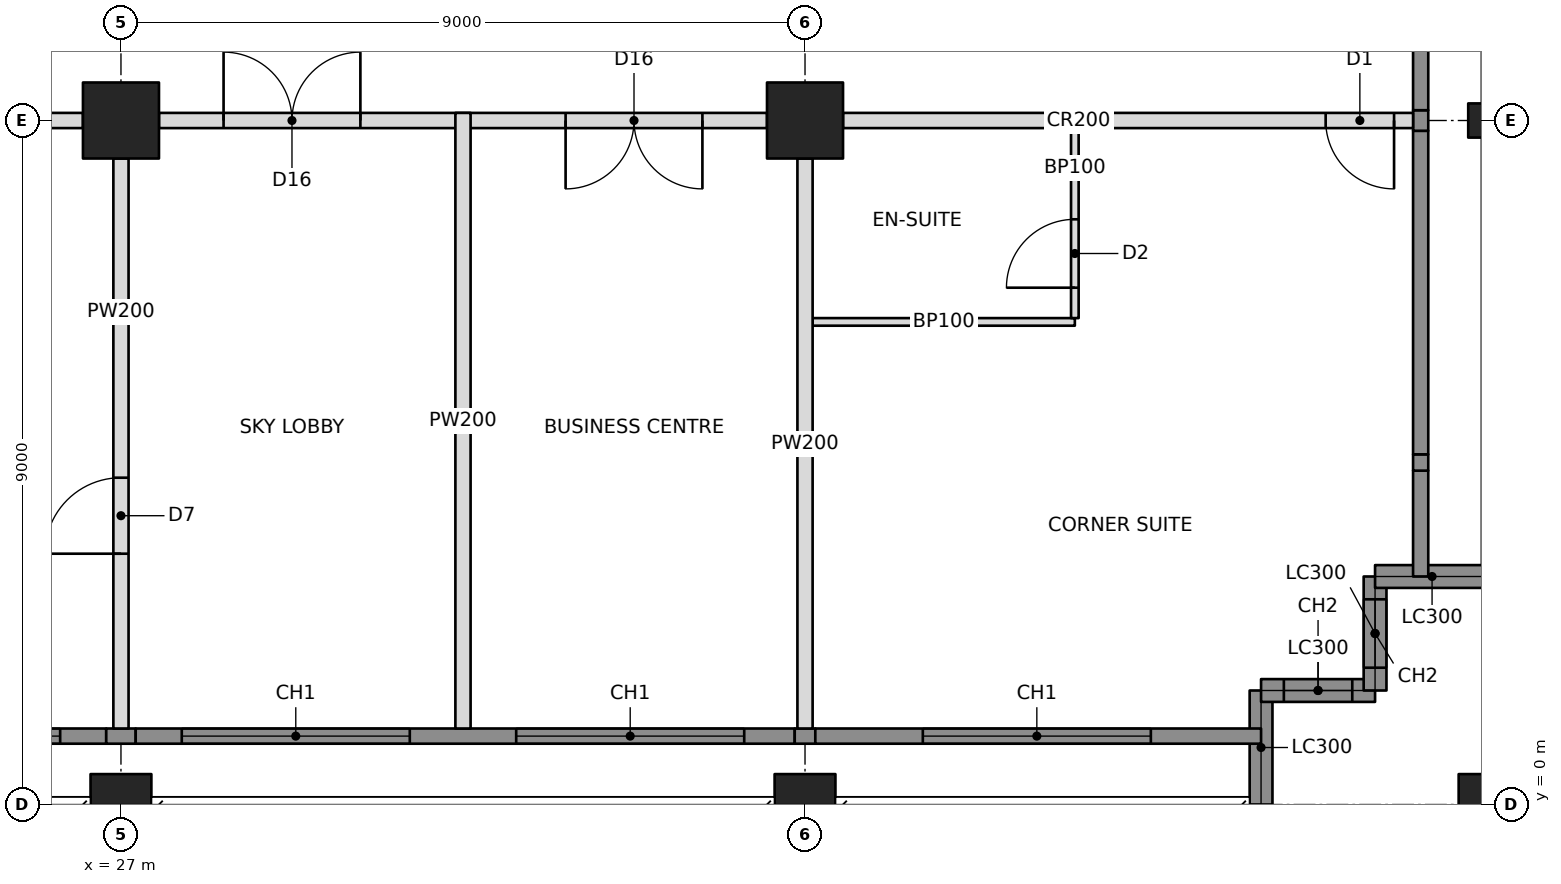
"""IFC4 building model, lengths in metres.
Left out: names, types, materials, properties, quantities, classifications, styles, units other than length and angle.
Written with IfcOpenShell. Run it as: python <this file> out.ifc"""

import sys

from ifc_helpers import new_model, si_unit, direction, frame, frame_2d, origin, origin_2d, place, context, subcontext, project, spatial, rectangle, hollow_rectangle, i_section, extrude, element, fill, save


model = new_model("IFC4")
c1 = context("Model", 3, precision=1e-05, world=origin(), true_north=direction((0.0, 1.0)))
c2 = subcontext(c1, "Body", "Model", "MODEL_VIEW")
j1 = project(units=[si_unit("LENGTHUNIT", "METRE"), si_unit("PLANEANGLEUNIT", "RADIAN")], contexts=[c1])
p1 = place(None, origin())
s1 = spatial("IfcSite", under=j1, at=p1, CompositionType="ELEMENT")
p2 = place(p1, origin())
s2 = spatial("IfcBuilding", under=s1, at=p2, CompositionType="ELEMENT")
p3 = place(p2, frame((0.0, 0.0, 160.4)))
s3 = spatial("IfcBuildingStorey", under=s2, at=p3, CompositionType="ELEMENT", Elevation=160.4)
p4 = place(p3, frame((27.0, 0.0, 0.0), z_axis=(0.0, 0.0, 1.0), x_axis=(1.0, 0.0, 0.0)))
e1 = element("IfcColumn", 1, at=p4, inside=s3, PredefinedType="COLUMN", context=c2, shape_type="SweptSolid", body=[
    extrude(hollow_rectangle(XDim=0.8, YDim=0.8, WallThickness=0.07, at=origin_2d()), origin(), (0.0, 0.0, 1.0), 3.4),
])
p5 = place(p3, frame((27.0, 9.0, 0.0), z_axis=(0.0, 0.0, 1.0), x_axis=(1.0, 0.0, 0.0)))
e2 = element("IfcColumn", 2, at=p5, inside=s3, PredefinedType="COLUMN", context=c2, shape_type="SweptSolid", body=[
    extrude(hollow_rectangle(XDim=1.0, YDim=1.0, WallThickness=0.1, at=origin_2d()), origin(), (0.0, 0.0, 1.0), 3.4),
])
p6 = place(p3, frame((36.0, 0.0, 0.0), z_axis=(0.0, 0.0, 1.0), x_axis=(1.0, 0.0, 0.0)))
e3 = element("IfcColumn", 3, at=p6, inside=s3, PredefinedType="COLUMN", context=c2, shape_type="SweptSolid", body=[
    extrude(hollow_rectangle(XDim=0.8, YDim=0.8, WallThickness=0.07, at=origin_2d()), origin(), (0.0, 0.0, 1.0), 3.4),
])
p7 = place(p3, frame((36.0, 9.0, 0.0), z_axis=(0.0, 0.0, 1.0), x_axis=(0.0, 1.0, 0.0)))
e4 = element("IfcColumn", 4, at=p7, inside=s3, PredefinedType="COLUMN", context=c2, shape_type="SweptSolid", body=[
    extrude(hollow_rectangle(XDim=1.0, YDim=1.0, WallThickness=0.1, at=origin_2d()), origin(), (0.0, 0.0, 1.0), 3.4),
])
p8 = place(p3, frame((45.0, 0.0, 0.0), z_axis=(0.0, 0.0, 1.0), x_axis=(1.0, 0.0, 0.0)))
e5 = element("IfcColumn", 5, at=p8, inside=s3, PredefinedType="COLUMN", context=c2, shape_type="SweptSolid", body=[
    extrude(hollow_rectangle(XDim=0.8, YDim=0.8, WallThickness=0.07, at=origin_2d()), origin(), (0.0, 0.0, 1.0), 3.4),
])
p9 = place(p3, frame((45.0, 9.0, 0.0), z_axis=(0.0, 0.0, 1.0), x_axis=(0.0, 1.0, 0.0)))
e6 = element("IfcColumn", 6, at=p9, inside=s3, PredefinedType="COLUMN", context=c2, shape_type="SweptSolid", body=[
    extrude(i_section(OverallWidth=0.449, OverallDepth=0.549, WebThickness=0.072, FlangeThickness=0.115, at=origin_2d()), origin(), (0.0, 0.0, 1.0), 3.4),
])
p10 = place(p3, frame((42.0, 0.0, 0.0), z_axis=(0.0, 0.0, 1.0), x_axis=(0.0, 1.0, 0.0)))
e7 = element("IfcWall", 7, at=p10, inside=s3, PredefinedType="SOLIDWALL", context=c2, shape_type="SweptSolid", body=[
    extrude(rectangle(XDim=1.5, YDim=0.3, at=frame_2d((0.75, 0.0))), origin(), (0.0, 0.0, 1.0), 2.42),
])
p11 = place(p3, frame((42.0, 1.5, 0.0), z_axis=(0.0, 0.0, 1.0), x_axis=(1.0, 0.0, 0.0)))
e8 = element("IfcWall", 8, at=p11, inside=s3, PredefinedType="SOLIDWALL", context=c2, shape_type="SweptSolid", body=[
    extrude(rectangle(XDim=1.5, YDim=0.3, at=frame_2d((0.75, 0.0))), origin(), (0.0, 0.0, 1.0), 3.2),
])
p12 = place(p11, frame((0.3, 0.0, 0.6)))
e9 = element("IfcOpeningElement", 9, at=p12, cuts=e8, PredefinedType="OPENING", context=c2, shape_type="SweptSolid", body=[
    extrude(rectangle(XDim=0.9, YDim=2.2, at=frame_2d((0.45, 1.1))), frame((0.0, 0.16, 0.0), z_axis=(0.0, -1.0, 0.0), x_axis=(1.0, 0.0, 0.0)), (0.0, 0.0, 1.0), 0.32),
])
p13 = place(p3, frame((43.5, 1.5, 0.0), z_axis=(0.0, 0.0, 1.0), x_axis=(0.0, 1.0, 0.0)))
e10 = element("IfcWall", 10, at=p13, inside=s3, PredefinedType="SOLIDWALL", context=c2, shape_type="SweptSolid", body=[
    extrude(rectangle(XDim=1.5, YDim=0.3, at=frame_2d((0.75, 0.0))), origin(), (0.0, 0.0, 1.0), 3.2),
])
p14 = place(p13, frame((0.3, 0.0, 0.6)))
e11 = element("IfcOpeningElement", 11, at=p14, cuts=e10, PredefinedType="OPENING", context=c2, shape_type="SweptSolid", body=[
    extrude(rectangle(XDim=0.9, YDim=2.2, at=frame_2d((0.45, 1.1))), frame((0.0, 0.16, 0.0), z_axis=(0.0, -1.0, 0.0), x_axis=(1.0, 0.0, 0.0)), (0.0, 0.0, 1.0), 0.32),
])
p15 = place(p3, frame((43.5, 3.0, 0.0), z_axis=(0.0, 0.0, 1.0), x_axis=(1.0, 0.0, 0.0)))
e12 = element("IfcWall", 12, at=p15, inside=s3, PredefinedType="SOLIDWALL", context=c2, shape_type="SweptSolid", body=[
    extrude(rectangle(XDim=1.5, YDim=0.3, at=frame_2d((0.75, 0.0))), origin(), (0.0, 0.0, 1.0), 2.42),
])
p16 = place(p3, frame((44.1, 3.0, 0.0), z_axis=(0.0, 0.0, 1.0), x_axis=(0.0, 1.0, 0.0)))
e13 = element("IfcWall", 13, at=p16, inside=s3, PredefinedType="SOLIDWALL", context=c2, shape_type="SweptSolid", body=[
    extrude(rectangle(XDim=1.393, YDim=0.2, at=frame_2d((0.696, 0.0))), origin(), (0.0, 0.0, 1.0), 3.2),
])
p17 = place(p3, frame((27.5, 9.0, 0.0), z_axis=(0.0, 0.0, 1.0), x_axis=(1.0, 0.0, 0.0)))
e14 = element("IfcWall", 14, at=p17, inside=s3, PredefinedType="PARTITIONING", context=c2, shape_type="SweptSolid", body=[
    extrude(rectangle(XDim=8.0, YDim=0.2, at=frame_2d((4.0, 0.0))), origin(), (0.0, 0.0, 1.0), 2.405),
])
p18 = place(p17, frame((0.85, 0.0, 0.0)))
e15 = element("IfcOpeningElement", 15, at=p18, cuts=e14, PredefinedType="OPENING", context=c2, shape_type="SweptSolid", body=[
    extrude(rectangle(XDim=1.8, YDim=2.4, at=frame_2d((0.9, 1.2))), frame((0.0, 0.11, 0.0), z_axis=(0.0, -1.0, 0.0), x_axis=(1.0, 0.0, 0.0)), (0.0, 0.0, 1.0), 0.22),
])
p19 = place(p17, frame((5.35, 0.0, 0.0)))
e16 = element("IfcOpeningElement", 16, at=p19, cuts=e14, PredefinedType="OPENING", context=c2, shape_type="SweptSolid", body=[
    extrude(rectangle(XDim=1.8, YDim=2.4, at=frame_2d((0.9, 1.2))), frame((0.0, 0.11, 0.0), z_axis=(0.0, -1.0, 0.0), x_axis=(1.0, 0.0, 0.0)), (0.0, 0.0, 1.0), 0.22),
])
p20 = place(p3, frame((36.5, 9.0, 0.0), z_axis=(0.0, 0.0, 1.0), x_axis=(1.0, 0.0, 0.0)))
e17 = element("IfcWall", 17, at=p20, inside=s3, PredefinedType="PARTITIONING", context=c2, shape_type="SweptSolid", body=[
    extrude(rectangle(XDim=7.5, YDim=0.2, at=frame_2d((3.75, 0.0))), origin(), (0.0, 0.0, 1.0), 2.438),
])
p21 = place(p20, frame((6.35, 0.0, 0.0)))
e18 = element("IfcOpeningElement", 18, at=p21, cuts=e17, PredefinedType="OPENING", context=c2, shape_type="SweptSolid", body=[
    extrude(rectangle(XDim=0.9, YDim=2.1, at=frame_2d((0.45, 1.05))), frame((0.0, 0.11, 0.0), z_axis=(0.0, -1.0, 0.0), x_axis=(1.0, 0.0, 0.0)), (0.0, 0.0, 1.0), 0.22),
])
p22 = place(p3, frame((27.0, 8.5, 0.0), z_axis=(0.0, 0.0, 1.0), x_axis=(0.0, -1.0, 0.0)))
e19 = element("IfcWall", 19, at=p22, inside=s3, PredefinedType="PARTITIONING", context=c2, shape_type="SweptSolid", body=[
    extrude(rectangle(XDim=7.5, YDim=0.2, at=frame_2d((3.75, 0.0))), origin(), (0.0, 0.0, 1.0), 2.405),
])
p23 = place(p22, frame((4.2, 0.0, 0.0)))
e20 = element("IfcOpeningElement", 20, at=p23, cuts=e19, PredefinedType="OPENING", context=c2, shape_type="SweptSolid", body=[
    extrude(rectangle(XDim=1.0, YDim=2.1, at=frame_2d((0.5, 1.05))), frame((0.0, 0.11, 0.0), z_axis=(0.0, -1.0, 0.0), x_axis=(1.0, 0.0, 0.0)), (0.0, 0.0, 1.0), 0.22),
])
p24 = place(p3, frame((36.0, 8.5, 0.0), z_axis=(0.0, 0.0, 1.0), x_axis=(0.0, -1.0, 0.0)))
e21 = element("IfcWall", 21, at=p24, inside=s3, PredefinedType="PARTITIONING", context=c2, shape_type="SweptSolid", body=[
    extrude(rectangle(XDim=7.5, YDim=0.2, at=frame_2d((3.75, 0.0))), origin(), (0.0, 0.0, 1.0), 2.438),
])
p25 = place(p3, frame((23.65, 9.0, 0.0), z_axis=(0.0, 0.0, 1.0), x_axis=(1.0, 0.0, 0.0)))
e22 = element("IfcWall", 22, at=p25, inside=s3, PredefinedType="PARTITIONING", context=c2, shape_type="SweptSolid", body=[
    extrude(rectangle(XDim=2.85, YDim=0.2, at=frame_2d((1.425, 0.0))), origin(), (0.0, 0.0, 1.0), 2.405),
])
p26 = place(p3, frame((31.5, 9.1, 0.0), z_axis=(0.0, 0.0, 1.0), x_axis=(0.0, -1.0, 0.0)))
e23 = element("IfcWall", 23, at=p26, inside=s3, PredefinedType="PARTITIONING", context=c2, shape_type="SweptSolid", body=[
    extrude(rectangle(XDim=8.1, YDim=0.2, at=frame_2d((4.05, 0.0))), origin(), (0.0, 0.0, 1.0), 2.404),
])
p27 = place(p3, frame((36.1, 6.35, 0.0), z_axis=(0.0, 0.0, 1.0), x_axis=(1.0, 0.0, 0.0)))
e24 = element("IfcWall", 24, at=p27, inside=s3, PredefinedType="PARTITIONING", context=c2, shape_type="SweptSolid", body=[
    extrude(rectangle(XDim=3.45, YDim=0.1, at=frame_2d((1.725, 0.0))), origin(), (0.0, 0.0, 1.0), 2.438),
])
p28 = place(p3, frame((39.55, 8.9, 0.0), z_axis=(0.0, 0.0, 1.0), x_axis=(0.0, -1.0, 0.0)))
e25 = element("IfcWall", 25, at=p28, inside=s3, PredefinedType="PARTITIONING", context=c2, shape_type="SweptSolid", body=[
    extrude(rectangle(XDim=2.5, YDim=0.1, at=frame_2d((1.25, 0.0))), origin(), (0.0, 0.0, 1.0), 2.438),
])
p29 = place(p28, frame((1.2, 0.0, 0.0)))
e26 = element("IfcOpeningElement", 26, at=p29, cuts=e25, PredefinedType="OPENING", context=c2, shape_type="SweptSolid", body=[
    extrude(rectangle(XDim=0.9, YDim=2.1, at=frame_2d((0.45, 1.05))), frame((0.0, 0.06, 0.0), z_axis=(0.0, -1.0, 0.0), x_axis=(1.0, 0.0, 0.0)), (0.0, 0.0, 1.0), 0.12),
])
p30 = place(p3, frame((18.194, 0.9, 0.0), z_axis=(0.0, 0.0, 1.0), x_axis=(1.0, 0.0, 0.0)))
e27 = element("IfcWall", 27, at=p30, inside=s3, PredefinedType="SOLIDWALL", context=c2, shape_type="SweptSolid", body=[
    extrude(rectangle(XDim=8.612, YDim=0.2, at=frame_2d((4.306, 0.0))), origin(), (0.0, 0.0, 1.0), 3.2),
])
p31 = place(p30, frame((0.606, 0.0, 0.6)))
e28 = element("IfcOpeningElement", 28, at=p31, cuts=e27, PredefinedType="OPENING", context=c2, shape_type="SweptSolid", body=[
    extrude(rectangle(XDim=3.0, YDim=2.2, at=frame_2d((1.5, 1.1))), frame((0.0, 0.11, 0.0), z_axis=(0.0, -1.0, 0.0), x_axis=(1.0, 0.0, 0.0)), (0.0, 0.0, 1.0), 0.22),
])
p32 = place(p30, frame((5.006, 0.0, 0.6)))
e29 = element("IfcOpeningElement", 29, at=p32, cuts=e27, PredefinedType="OPENING", context=c2, shape_type="SweptSolid", body=[
    extrude(rectangle(XDim=3.0, YDim=2.2, at=frame_2d((1.5, 1.1))), frame((0.0, 0.11, 0.0), z_axis=(0.0, -1.0, 0.0), x_axis=(1.0, 0.0, 0.0)), (0.0, 0.0, 1.0), 0.22),
])
p33 = place(p3, frame((26.806, 0.9, 0.0), z_axis=(0.0, 0.0, 1.0), x_axis=(1.0, 0.0, 0.0)))
e30 = element("IfcWall", 30, at=p33, inside=s3, PredefinedType="SOLIDWALL", context=c2, shape_type="SweptSolid", body=[
    extrude(rectangle(XDim=0.388, YDim=0.2, at=frame_2d((0.194, 0.0))), origin(), (0.0, 0.0, 1.0), 2.404),
])
p34 = place(p3, frame((27.194, 0.9, 0.0), z_axis=(0.0, 0.0, 1.0), x_axis=(1.0, 0.0, 0.0)))
e31 = element("IfcWall", 31, at=p34, inside=s3, PredefinedType="SOLIDWALL", context=c2, shape_type="SweptSolid", body=[
    extrude(rectangle(XDim=8.671, YDim=0.2, at=frame_2d((4.335, 0.0))), origin(), (0.0, 0.0, 1.0), 3.2),
])
p35 = place(p34, frame((0.606, 0.0, 0.6)))
e32 = element("IfcOpeningElement", 32, at=p35, cuts=e31, PredefinedType="OPENING", context=c2, shape_type="SweptSolid", body=[
    extrude(rectangle(XDim=3.0, YDim=2.2, at=frame_2d((1.5, 1.1))), frame((0.0, 0.11, 0.0), z_axis=(0.0, -1.0, 0.0), x_axis=(1.0, 0.0, 0.0)), (0.0, 0.0, 1.0), 0.22),
])
p36 = place(p34, frame((5.006, 0.0, 0.6)))
e33 = element("IfcOpeningElement", 33, at=p36, cuts=e31, PredefinedType="OPENING", context=c2, shape_type="SweptSolid", body=[
    extrude(rectangle(XDim=3.0, YDim=2.2, at=frame_2d((1.5, 1.1))), frame((0.0, 0.11, 0.0), z_axis=(0.0, -1.0, 0.0), x_axis=(1.0, 0.0, 0.0)), (0.0, 0.0, 1.0), 0.22),
])
p37 = place(p3, frame((35.865, 0.9, 0.0), z_axis=(0.0, 0.0, 1.0), x_axis=(1.0, 0.0, 0.0)))
e34 = element("IfcWall", 34, at=p37, inside=s3, PredefinedType="SOLIDWALL", context=c2, shape_type="SweptSolid", body=[
    extrude(rectangle(XDim=0.271, YDim=0.2, at=frame_2d((0.135, 0.0))), origin(), (0.0, 0.0, 1.0), 2.438),
])
p38 = place(p3, frame((36.135, 0.9, 0.0), z_axis=(0.0, 0.0, 1.0), x_axis=(1.0, 0.0, 0.0)))
e35 = element("IfcWall", 35, at=p38, inside=s3, PredefinedType="SOLIDWALL", context=c2, shape_type="SweptSolid", body=[
    extrude(rectangle(XDim=5.865, YDim=0.2, at=frame_2d((2.932, 0.0))), origin(), (0.0, 0.0, 1.0), 3.2),
])
p39 = place(p38, frame((1.415, 0.0, 0.6)))
e36 = element("IfcOpeningElement", 36, at=p39, cuts=e35, PredefinedType="OPENING", context=c2, shape_type="SweptSolid", body=[
    extrude(rectangle(XDim=3.0, YDim=2.2, at=frame_2d((1.5, 1.1))), frame((0.0, 0.11, 0.0), z_axis=(0.0, -1.0, 0.0), x_axis=(1.0, 0.0, 0.0)), (0.0, 0.0, 1.0), 0.22),
])
p40 = place(p3, frame((44.1, 4.393, 0.0), z_axis=(0.0, 0.0, 1.0), x_axis=(0.0, 1.0, 0.0)))
e37 = element("IfcWall", 37, at=p40, inside=s3, PredefinedType="SOLIDWALL", context=c2, shape_type="SweptSolid", body=[
    extrude(rectangle(XDim=0.215, YDim=0.2, at=frame_2d((0.107, 0.0))), origin(), (0.0, 0.0, 1.0), 2.661),
])
p41 = place(p3, frame((44.1, 4.607, 0.0), z_axis=(0.0, 0.0, 1.0), x_axis=(0.0, 1.0, 0.0)))
e38 = element("IfcWall", 38, at=p41, inside=s3, PredefinedType="SOLIDWALL", context=c2, shape_type="SweptSolid", body=[
    extrude(rectangle(XDim=4.257, YDim=0.2, at=frame_2d((2.129, 0.0))), origin(), (0.0, 0.0, 1.0), 3.2),
])
p42 = place(p3, frame((44.1, 8.865, 0.0), z_axis=(0.0, 0.0, 1.0), x_axis=(0.0, 1.0, 0.0)))
e39 = element("IfcWall", 39, at=p42, inside=s3, PredefinedType="SOLIDWALL", context=c2, shape_type="SweptSolid", body=[
    extrude(rectangle(XDim=0.271, YDim=0.2, at=frame_2d((0.135, 0.0))), origin(), (0.0, 0.0, 1.0), 2.438),
])
p43 = place(p3, frame((44.1, 9.135, 0.0), z_axis=(0.0, 0.0, 1.0), x_axis=(0.0, 1.0, 0.0)))
e40 = element("IfcWall", 40, at=p43, inside=s3, PredefinedType="SOLIDWALL", context=c2, shape_type="SweptSolid", body=[
    extrude(rectangle(XDim=8.671, YDim=0.2, at=frame_2d((4.335, 0.0))), origin(), (0.0, 0.0, 1.0), 3.2),
])
p44 = place(p43, frame((2.015, 0.0, 0.6)))
e41 = element("IfcOpeningElement", 41, at=p44, cuts=e40, PredefinedType="OPENING", context=c2, shape_type="SweptSolid", body=[
    extrude(rectangle(XDim=3.0, YDim=2.2, at=frame_2d((1.5, 1.1))), frame((0.0, 0.11, 0.0), z_axis=(0.0, -1.0, 0.0), x_axis=(1.0, 0.0, 0.0)), (0.0, 0.0, 1.0), 0.22),
])
p45 = place(p43, frame((5.515, 0.0, 0.6)))
e42 = element("IfcOpeningElement", 42, at=p45, cuts=e40, PredefinedType="OPENING", context=c2, shape_type="SweptSolid", body=[
    extrude(rectangle(XDim=3.0, YDim=2.2, at=frame_2d((1.5, 1.1))), frame((0.0, 0.11, 0.0), z_axis=(0.0, -1.0, 0.0), x_axis=(1.0, 0.0, 0.0)), (0.0, 0.0, 1.0), 0.22),
])
p46 = place(p12, origin())
e43 = element("IfcWindow", 43, at=p46, inside=s3, PartitioningType="SINGLE_PANEL", PredefinedType="WINDOW", context=c2, shape_type="SweptSolid", body=[
    extrude(rectangle(XDim=0.9, YDim=2.2, at=frame_2d((0.45, 1.1))), frame((0.0, 0.03, 0.0), z_axis=(0.0, -1.0, 0.0), x_axis=(1.0, 0.0, 0.0)), (0.0, 0.0, 1.0), 0.06),
])
fill(e9, e43)
p47 = place(p14, origin())
e44 = element("IfcWindow", 44, at=p47, inside=s3, PartitioningType="SINGLE_PANEL", PredefinedType="WINDOW", context=c2, shape_type="SweptSolid", body=[
    extrude(rectangle(XDim=0.9, YDim=2.2, at=frame_2d((0.45, 1.1))), frame((0.0, 0.03, 0.0), z_axis=(0.0, -1.0, 0.0), x_axis=(1.0, 0.0, 0.0)), (0.0, 0.0, 1.0), 0.06),
])
fill(e11, e44)
p48 = place(p32, origin())
e45 = element("IfcWindow", 45, at=p48, inside=s3, PartitioningType="TRIPLE_PANEL_VERTICAL", PredefinedType="WINDOW", context=c2, shape_type="SweptSolid", body=[
    extrude(rectangle(XDim=3.0, YDim=2.2, at=frame_2d((1.5, 1.1))), frame((0.0, 0.03, 0.0), z_axis=(0.0, -1.0, 0.0), x_axis=(1.0, 0.0, 0.0)), (0.0, 0.0, 1.0), 0.06),
])
fill(e29, e45)
p49 = place(p35, origin())
e46 = element("IfcWindow", 46, at=p49, inside=s3, PartitioningType="TRIPLE_PANEL_VERTICAL", PredefinedType="WINDOW", context=c2, shape_type="SweptSolid", body=[
    extrude(rectangle(XDim=3.0, YDim=2.2, at=frame_2d((1.5, 1.1))), frame((0.0, 0.03, 0.0), z_axis=(0.0, -1.0, 0.0), x_axis=(1.0, 0.0, 0.0)), (0.0, 0.0, 1.0), 0.06),
])
fill(e32, e46)
p50 = place(p36, origin())
e47 = element("IfcWindow", 47, at=p50, inside=s3, PartitioningType="TRIPLE_PANEL_VERTICAL", PredefinedType="WINDOW", context=c2, shape_type="SweptSolid", body=[
    extrude(rectangle(XDim=3.0, YDim=2.2, at=frame_2d((1.5, 1.1))), frame((0.0, 0.03, 0.0), z_axis=(0.0, -1.0, 0.0), x_axis=(1.0, 0.0, 0.0)), (0.0, 0.0, 1.0), 0.06),
])
fill(e33, e47)
p51 = place(p39, origin())
e48 = element("IfcWindow", 48, at=p51, inside=s3, PartitioningType="TRIPLE_PANEL_VERTICAL", PredefinedType="WINDOW", context=c2, shape_type="SweptSolid", body=[
    extrude(rectangle(XDim=3.0, YDim=2.2, at=frame_2d((1.5, 1.1))), frame((0.0, 0.03, 0.0), z_axis=(0.0, -1.0, 0.0), x_axis=(1.0, 0.0, 0.0)), (0.0, 0.0, 1.0), 0.06),
])
fill(e36, e48)
p52 = place(p23, frame((1.0, 0.0, 0.0), z_axis=(0.0, 0.0, 1.0), x_axis=(-1.0, 0.0, 0.0)))
e49 = element("IfcDoor", 49, at=p52, inside=s3, OperationType="SINGLE_SWING_LEFT", PredefinedType="DOOR", context=c2, shape_type="SweptSolid", body=[
    extrude(rectangle(XDim=1.0, YDim=2.1, at=frame_2d((0.5, 1.05))), frame((0.0, 0.025, 0.0), z_axis=(0.0, -1.0, 0.0), x_axis=(1.0, 0.0, 0.0)), (0.0, 0.0, 1.0), 0.05),
])
fill(e20, e49)
p53 = place(p18, origin())
e50 = element("IfcDoor", 50, at=p53, inside=s3, OperationType="DOUBLE_DOOR_SINGLE_SWING", PredefinedType="DOOR", context=c2, shape_type="SweptSolid", body=[
    extrude(rectangle(XDim=1.8, YDim=2.4, at=frame_2d((0.9, 1.2))), frame((0.0, 0.025, 0.0), z_axis=(0.0, -1.0, 0.0), x_axis=(1.0, 0.0, 0.0)), (0.0, 0.0, 1.0), 0.05),
])
fill(e15, e50)
p54 = place(p19, frame((1.8, 0.0, 0.0), z_axis=(0.0, 0.0, 1.0), x_axis=(-1.0, 0.0, 0.0)))
e51 = element("IfcDoor", 51, at=p54, inside=s3, OperationType="DOUBLE_DOOR_SINGLE_SWING", PredefinedType="DOOR", context=c2, shape_type="SweptSolid", body=[
    extrude(rectangle(XDim=1.8, YDim=2.4, at=frame_2d((0.9, 1.2))), frame((0.0, 0.025, 0.0), z_axis=(0.0, -1.0, 0.0), x_axis=(1.0, 0.0, 0.0)), (0.0, 0.0, 1.0), 0.05),
])
fill(e16, e51)
p55 = place(p29, frame((0.9, 0.0, 0.0), z_axis=(0.0, 0.0, 1.0), x_axis=(-1.0, 0.0, 0.0)))
e52 = element("IfcDoor", 52, at=p55, inside=s3, OperationType="SINGLE_SWING_LEFT", PredefinedType="DOOR", context=c2, shape_type="SweptSolid", body=[
    extrude(rectangle(XDim=0.9, YDim=2.1, at=frame_2d((0.45, 1.05))), frame((0.0, 0.025, 0.0), z_axis=(0.0, -1.0, 0.0), x_axis=(1.0, 0.0, 0.0)), (0.0, 0.0, 1.0), 0.05),
])
fill(e26, e52)
p56 = place(p21, frame((0.9, 0.0, 0.0), z_axis=(0.0, 0.0, 1.0), x_axis=(-1.0, 0.0, 0.0)))
e53 = element("IfcDoor", 53, at=p56, inside=s3, OperationType="SINGLE_SWING_LEFT", PredefinedType="DOOR", context=c2, shape_type="SweptSolid", body=[
    extrude(rectangle(XDim=0.9, YDim=2.1, at=frame_2d((0.45, 1.05))), frame((0.0, 0.025, 0.0), z_axis=(0.0, -1.0, 0.0), x_axis=(1.0, 0.0, 0.0)), (0.0, 0.0, 1.0), 0.05),
])
fill(e18, e53)
save(model, sys.argv[1])
